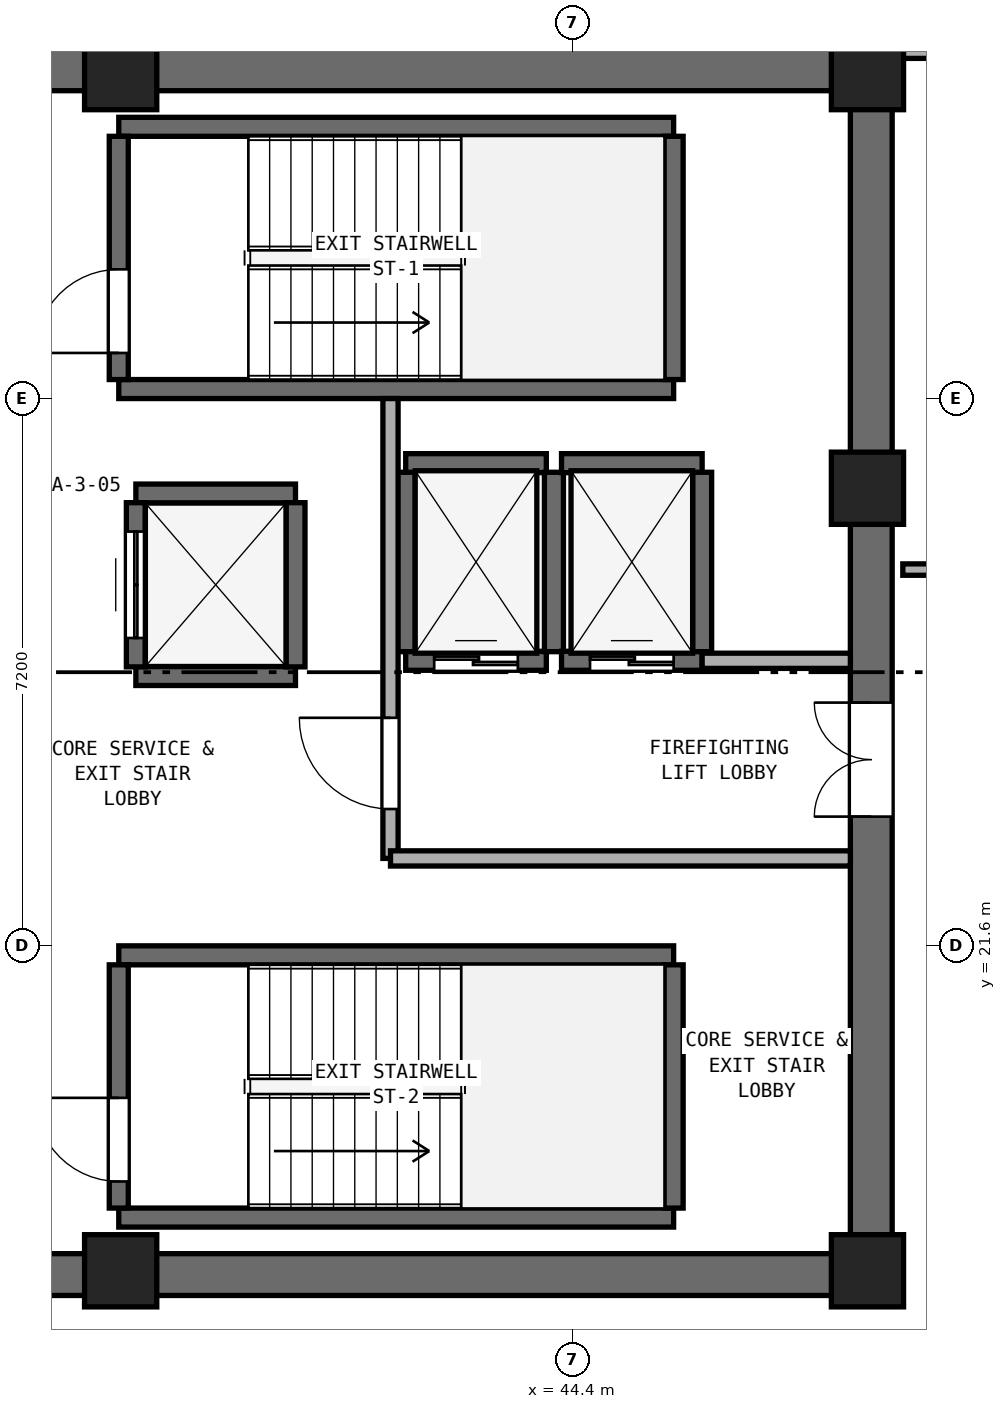
"""IFC4 building model, lengths in metres.
Left out: names, types, materials, properties, quantities, classifications, styles, units other than length and angle.
Written with IfcOpenShell. Run it as: python <this file> out.ifc"""

import sys

from ifc_helpers import new_model, si_unit, direction, frame, frame_2d, origin, origin_2d, place, context, subcontext, project, spatial, rectangle, extrude, element, fill, save


model = new_model("IFC4")
c1 = context("Model", 3, precision=1e-05, world=origin(), true_north=direction((0.0, 1.0)))
c2 = subcontext(c1, "Body", "Model", "MODEL_VIEW")
j1 = project(units=[si_unit("LENGTHUNIT", "METRE"), si_unit("PLANEANGLEUNIT", "RADIAN")], contexts=[c1])
p1 = place(None, origin())
s1 = spatial("IfcSite", under=j1, at=p1, CompositionType="ELEMENT")
p2 = place(p1, origin())
s2 = spatial("IfcBuilding", under=s1, at=p2, CompositionType="ELEMENT")
p3 = place(p2, frame((0.0, 0.0, 159.2)))
s3 = spatial("IfcBuildingStorey", under=s2, at=p3, CompositionType="ELEMENT", Elevation=159.2)
for number, where, z_axis, x_axis in (
    (1, (25.4, 17.275, 0.0), (0.0, 0.0, 1.0), (1.0, 0.0, 0.0)),
    (2, (25.4, 33.125, 0.0), (0.0, 0.0, 1.0), (1.0, 0.0, 0.0)),
):
    element("IfcWall", number, at=place(p3, frame(where, z_axis=z_axis, x_axis=x_axis)), inside=s3, PredefinedType="SHEAR", context=c2, shape_type="SweptSolid", body=[
        extrude(rectangle(XDim=23.2, YDim=0.55, at=frame_2d((11.6, 0.0))), origin(), (0.0, 0.0, 1.0), 3.54),
    ])
p4 = place(p3, frame((48.325, 17.55, 0.0), z_axis=(0.0, 0.0, 1.0), x_axis=(0.0, 1.0, 0.0)))
e3 = element("IfcWall", 3, at=p4, inside=s3, PredefinedType="SHEAR", context=c2, shape_type="SweptSolid", body=[
    extrude(rectangle(XDim=15.3, YDim=0.55, at=frame_2d((7.65, 0.0))), origin(), (0.0, 0.0, 1.0), 3.54),
])
p5 = place(p4, frame((5.75, 0.0, 0.0)))
e4 = element("IfcOpeningElement", 4, at=p5, cuts=e3, PredefinedType="OPENING", context=c2, shape_type="SweptSolid", body=[
    extrude(rectangle(XDim=1.5, YDim=2.15, at=frame_2d((0.75, 1.075))), frame((0.0, 0.285, 0.0), z_axis=(0.0, -1.0, 0.0), x_axis=(1.0, 0.0, 0.0)), (0.0, 0.0, 1.0), 0.57),
])
for number, where, z_axis, x_axis in (
    (5, (38.45, 17.325, 0.0), (0.0, 0.0, 1.0), (1.0, 0.0, 0.0)),
    (6, (48.275, 17.325, 0.0), (0.0, 0.0, 1.0), (1.0, 0.0, 0.0)),
    (7, (48.275, 27.62, 0.0), (0.0, 0.0, 1.0), (1.0, 0.0, 0.0)),
    (8, (48.275, 33.075, 0.0), (0.0, 0.0, 1.0), (1.0, 0.0, 0.0)),
    (9, (38.45, 33.075, 0.0), (0.0, 0.0, 1.0), (1.0, 0.0, 0.0)),
):
    element("IfcColumn", number, at=place(p3, frame(where, z_axis=z_axis, x_axis=x_axis)), inside=s3, PredefinedType="PILASTER", context=c2, shape_type="SweptSolid", body=[
        extrude(rectangle(XDim=0.95, YDim=0.95, at=origin_2d()), origin(), (0.0, 0.0, 1.0), 3.8),
    ])
for number, where, z_axis, x_axis in (
    (10, (38.425, 28.925, 0.0), (0.0, 0.0, 1.0), (1.0, 0.0, 0.0)),
    (11, (38.425, 32.375, 0.0), (0.0, 0.0, 1.0), (1.0, 0.0, 0.0)),
):
    element("IfcWall", number, at=place(p3, frame(where, z_axis=z_axis, x_axis=x_axis)), inside=s3, PredefinedType="SHEAR", context=c2, shape_type="SweptSolid", body=[
        extrude(rectangle(XDim=7.3, YDim=0.25, at=frame_2d((3.65, 0.0))), origin(), (0.0, 0.0, 1.0), 3.54),
    ])
p6 = place(p3, frame((38.425, 29.05, 0.0), z_axis=(0.0, 0.0, 1.0), x_axis=(0.0, 1.0, 0.0)))
e12 = element("IfcWall", 12, at=p6, inside=s3, PredefinedType="SHEAR", context=c2, shape_type="SweptSolid", body=[
    extrude(rectangle(XDim=3.2, YDim=0.25, at=frame_2d((1.6, 0.0))), origin(), (0.0, 0.0, 1.0), 3.54),
])
p7 = place(p6, frame((0.35, 0.0, 0.0)))
e13 = element("IfcOpeningElement", 13, at=p7, cuts=e12, PredefinedType="OPENING", context=c2, shape_type="SweptSolid", body=[
    extrude(rectangle(XDim=1.1, YDim=2.15, at=frame_2d((0.55, 1.075))), frame((0.0, 0.135, 0.0), z_axis=(0.0, -1.0, 0.0), x_axis=(1.0, 0.0, 0.0)), (0.0, 0.0, 1.0), 0.27),
])
p8 = place(p3, frame((45.725, 29.05, 0.0), z_axis=(0.0, 0.0, 1.0), x_axis=(0.0, 1.0, 0.0)))
e14 = element("IfcWall", 14, at=p8, inside=s3, PredefinedType="SHEAR", context=c2, shape_type="SweptSolid", body=[
    extrude(rectangle(XDim=3.2, YDim=0.25, at=frame_2d((1.6, 0.0))), origin(), (0.0, 0.0, 1.0), 3.54),
])
for number, where, z_axis, x_axis in (
    (15, (38.425, 18.025, 0.0), (0.0, 0.0, 1.0), (1.0, 0.0, 0.0)),
    (16, (38.425, 21.475, 0.0), (0.0, 0.0, 1.0), (1.0, 0.0, 0.0)),
):
    element("IfcWall", number, at=place(p3, frame(where, z_axis=z_axis, x_axis=x_axis)), inside=s3, PredefinedType="SHEAR", context=c2, shape_type="SweptSolid", body=[
        extrude(rectangle(XDim=7.3, YDim=0.25, at=frame_2d((3.65, 0.0))), origin(), (0.0, 0.0, 1.0), 3.54),
    ])
p9 = place(p3, frame((38.425, 18.15, 0.0), z_axis=(0.0, 0.0, 1.0), x_axis=(0.0, 1.0, 0.0)))
e17 = element("IfcWall", 17, at=p9, inside=s3, PredefinedType="SHEAR", context=c2, shape_type="SweptSolid", body=[
    extrude(rectangle(XDim=3.2, YDim=0.25, at=frame_2d((1.6, 0.0))), origin(), (0.0, 0.0, 1.0), 3.54),
])
p10 = place(p9, frame((0.35, 0.0, 0.0)))
e18 = element("IfcOpeningElement", 18, at=p10, cuts=e17, PredefinedType="OPENING", context=c2, shape_type="SweptSolid", body=[
    extrude(rectangle(XDim=1.1, YDim=2.15, at=frame_2d((0.55, 1.075))), frame((0.0, 0.135, 0.0), z_axis=(0.0, -1.0, 0.0), x_axis=(1.0, 0.0, 0.0)), (0.0, 0.0, 1.0), 0.27),
])
p11 = place(p3, frame((45.725, 18.15, 0.0), z_axis=(0.0, 0.0, 1.0), x_axis=(0.0, 1.0, 0.0)))
e19 = element("IfcWall", 19, at=p11, inside=s3, PredefinedType="SHEAR", context=c2, shape_type="SweptSolid", body=[
    extrude(rectangle(XDim=3.2, YDim=0.25, at=frame_2d((1.6, 0.0))), origin(), (0.0, 0.0, 1.0), 3.54),
])
p12 = place(p3, frame((42.2, 25.35, 0.0), z_axis=(0.0, 0.0, 1.0), x_axis=(1.0, 0.0, 0.0)))
e20 = element("IfcWall", 20, at=p12, inside=s3, PredefinedType="SHEAR", context=c2, shape_type="SweptSolid", body=[
    extrude(rectangle(XDim=1.85, YDim=0.25, at=frame_2d((0.925, 0.0))), origin(), (0.0, 0.0, 1.0), 3.54),
])
p13 = place(p12, frame((0.375, 0.0, 0.0)))
e21 = element("IfcOpeningElement", 21, at=p13, cuts=e20, PredefinedType="OPENING", context=c2, shape_type="SweptSolid", body=[
    extrude(rectangle(XDim=1.1, YDim=2.15, at=frame_2d((0.55, 1.075))), frame((0.0, 0.135, 0.0), z_axis=(0.0, -1.0, 0.0), x_axis=(1.0, 0.0, 0.0)), (0.0, 0.0, 1.0), 0.27),
])
p14 = place(p3, frame((42.2, 27.95, 0.0), z_axis=(0.0, 0.0, 1.0), x_axis=(1.0, 0.0, 0.0)))
e22 = element("IfcWall", 22, at=p14, inside=s3, PredefinedType="SHEAR", context=c2, shape_type="SweptSolid", body=[
    extrude(rectangle(XDim=1.85, YDim=0.25, at=frame_2d((0.925, 0.0))), origin(), (0.0, 0.0, 1.0), 3.54),
])
for number, where, z_axis, x_axis in (
    (23, (42.2, 25.47, 0.0), (0.0, 0.0, 1.0), (0.0, 1.0, 0.0)),
    (24, (44.15, 25.47, 0.0), (0.0, 0.0, 1.0), (0.0, 1.0, 0.0)),
):
    element("IfcWall", number, at=place(p3, frame(where, z_axis=z_axis, x_axis=x_axis)), inside=s3, PredefinedType="SHEAR", context=c2, shape_type="SweptSolid", body=[
        extrude(rectangle(XDim=2.36, YDim=0.25, at=frame_2d((1.18, 0.0))), origin(), (0.0, 0.0, 1.0), 3.54),
    ])
p15 = place(p3, frame((44.25, 25.35, 0.0), z_axis=(0.0, 0.0, 1.0), x_axis=(1.0, 0.0, 0.0)))
e25 = element("IfcWall", 25, at=p15, inside=s3, PredefinedType="SHEAR", context=c2, shape_type="SweptSolid", body=[
    extrude(rectangle(XDim=1.85, YDim=0.25, at=frame_2d((0.925, 0.0))), origin(), (0.0, 0.0, 1.0), 3.54),
])
p16 = place(p15, frame((0.375, 0.0, 0.0)))
e26 = element("IfcOpeningElement", 26, at=p16, cuts=e25, PredefinedType="OPENING", context=c2, shape_type="SweptSolid", body=[
    extrude(rectangle(XDim=1.1, YDim=2.15, at=frame_2d((0.55, 1.075))), frame((0.0, 0.135, 0.0), z_axis=(0.0, -1.0, 0.0), x_axis=(1.0, 0.0, 0.0)), (0.0, 0.0, 1.0), 0.27),
])
p17 = place(p3, frame((44.25, 27.95, 0.0), z_axis=(0.0, 0.0, 1.0), x_axis=(1.0, 0.0, 0.0)))
e27 = element("IfcWall", 27, at=p17, inside=s3, PredefinedType="SHEAR", context=c2, shape_type="SweptSolid", body=[
    extrude(rectangle(XDim=1.85, YDim=0.25, at=frame_2d((0.925, 0.0))), origin(), (0.0, 0.0, 1.0), 3.54),
])
p18 = place(p3, frame((46.1, 25.47, 0.0), z_axis=(0.0, 0.0, 1.0), x_axis=(0.0, 1.0, 0.0)))
e28 = element("IfcWall", 28, at=p18, inside=s3, PredefinedType="SHEAR", context=c2, shape_type="SweptSolid", body=[
    extrude(rectangle(XDim=2.36, YDim=0.25, at=frame_2d((1.18, 0.0))), origin(), (0.0, 0.0, 1.0), 3.54),
])
for number, where, z_axis, x_axis in (
    (29, (38.65, 25.15, 0.0), (0.0, 0.0, 1.0), (1.0, 0.0, 0.0)),
    (30, (38.65, 27.55, 0.0), (0.0, 0.0, 1.0), (1.0, 0.0, 0.0)),
):
    element("IfcWall", number, at=place(p3, frame(where, z_axis=z_axis, x_axis=x_axis)), inside=s3, PredefinedType="SHEAR", context=c2, shape_type="SweptSolid", body=[
        extrude(rectangle(XDim=2.1, YDim=0.25, at=frame_2d((1.05, 0.0))), origin(), (0.0, 0.0, 1.0), 3.54),
    ])
p19 = place(p3, frame((38.65, 25.27, 0.0), z_axis=(0.0, 0.0, 1.0), x_axis=(0.0, 1.0, 0.0)))
e31 = element("IfcWall", 31, at=p19, inside=s3, PredefinedType="SHEAR", context=c2, shape_type="SweptSolid", body=[
    extrude(rectangle(XDim=2.16, YDim=0.25, at=frame_2d((1.08, 0.0))), origin(), (0.0, 0.0, 1.0), 3.54),
])
p20 = place(p19, frame((0.38, 0.0, 0.0)))
e32 = element("IfcOpeningElement", 32, at=p20, cuts=e31, PredefinedType="OPENING", context=c2, shape_type="SweptSolid", body=[
    extrude(rectangle(XDim=1.4, YDim=2.2, at=frame_2d((0.7, 1.1))), frame((0.0, 0.135, 0.0), z_axis=(0.0, -1.0, 0.0), x_axis=(1.0, 0.0, 0.0)), (0.0, 0.0, 1.0), 0.27),
])
p21 = place(p3, frame((40.75, 25.27, 0.0), z_axis=(0.0, 0.0, 1.0), x_axis=(0.0, 1.0, 0.0)))
e33 = element("IfcWall", 33, at=p21, inside=s3, PredefinedType="SHEAR", context=c2, shape_type="SweptSolid", body=[
    extrude(rectangle(XDim=2.16, YDim=0.25, at=frame_2d((1.08, 0.0))), origin(), (0.0, 0.0, 1.0), 3.54),
])
p22 = place(p3, frame((42.0, 22.75, 0.0), z_axis=(0.0, 0.0, 1.0), x_axis=(0.0, 1.0, 0.0)))
e34 = element("IfcWall", 34, at=p22, inside=s3, PredefinedType="SOLIDWALL", context=c2, shape_type="SweptSolid", body=[
    extrude(rectangle(XDim=6.05, YDim=0.2, at=frame_2d((3.025, 0.0))), origin(), (0.0, 0.0, 1.0), 3.54),
])
p23 = place(p22, frame((0.65, 0.0, 0.0)))
e35 = element("IfcOpeningElement", 35, at=p23, cuts=e34, PredefinedType="OPENING", context=c2, shape_type="SweptSolid", body=[
    extrude(rectangle(XDim=1.2, YDim=2.15, at=frame_2d((0.6, 1.075))), frame((0.0, 0.11, 0.0), z_axis=(0.0, -1.0, 0.0), x_axis=(1.0, 0.0, 0.0)), (0.0, 0.0, 1.0), 0.22),
])
p24 = place(p3, frame((42.0, 22.75, 0.0), z_axis=(0.0, 0.0, 1.0), x_axis=(1.0, 0.0, 0.0)))
e36 = element("IfcWall", 36, at=p24, inside=s3, PredefinedType="SOLIDWALL", context=c2, shape_type="SweptSolid", body=[
    extrude(rectangle(XDim=6.05, YDim=0.2, at=frame_2d((3.025, 0.0))), origin(), (0.0, 0.0, 1.0), 3.54),
])
p25 = place(p3, frame((46.1, 25.35, 0.0), z_axis=(0.0, 0.0, 1.0), x_axis=(1.0, 0.0, 0.0)))
e37 = element("IfcWall", 37, at=p25, inside=s3, PredefinedType="SOLIDWALL", context=c2, shape_type="SweptSolid", body=[
    extrude(rectangle(XDim=1.95, YDim=0.2, at=frame_2d((0.975, 0.0))), origin(), (0.0, 0.0, 1.0), 3.54),
])
p26 = place(p3, frame((48.74, 26.55, 0.0), z_axis=(0.0, 0.0, 1.0), x_axis=(1.0, 0.0, 0.0)))
e38 = element("IfcWall", 38, at=p26, inside=s3, PredefinedType="PARTITIONING", context=c2, shape_type="SweptSolid", body=[
    extrude(rectangle(XDim=12.855, YDim=0.15, at=frame_2d((6.427, 0.0))), origin(), (0.0, 0.0, 1.0), 3.54),
])
p27 = place(p26, frame((5.927, 0.0, 0.0)))
e39 = element("IfcOpeningElement", 39, at=p27, cuts=e38, PredefinedType="OPENING", context=c2, shape_type="SweptSolid", body=[
    extrude(rectangle(XDim=1.0, YDim=2.12, at=frame_2d((0.5, 1.06))), frame((0.0, 0.085, 0.0), z_axis=(0.0, -1.0, 0.0), x_axis=(1.0, 0.0, 0.0)), (0.0, 0.0, 1.0), 0.17),
])
p28 = place(p3, frame((48.74, 33.35, 0.0), z_axis=(0.0, 0.0, 1.0), x_axis=(1.0, 0.0, 0.0)))
e40 = element("IfcWall", 40, at=p28, inside=s3, PredefinedType="PARTITIONING", context=c2, shape_type="SweptSolid", body=[
    extrude(rectangle(XDim=3.309, YDim=0.15, at=frame_2d((1.654, 0.0))), origin(), (0.0, 0.0, 1.0), 2.923),
])
p29 = place(p7, origin())
e41 = element("IfcDoor", 41, at=p29, inside=s3, OperationType="SINGLE_SWING_LEFT", PredefinedType="DOOR", context=c2, shape_type="SweptSolid", body=[
    extrude(rectangle(XDim=1.1, YDim=2.15, at=frame_2d((0.55, 1.075))), frame((0.0, 0.025, 0.0), z_axis=(0.0, -1.0, 0.0), x_axis=(1.0, 0.0, 0.0)), (0.0, 0.0, 1.0), 0.05),
])
fill(e13, e41)
p30 = place(p10, origin())
e42 = element("IfcDoor", 42, at=p30, inside=s3, OperationType="SINGLE_SWING_RIGHT", PredefinedType="DOOR", context=c2, shape_type="SweptSolid", body=[
    extrude(rectangle(XDim=1.1, YDim=2.15, at=frame_2d((0.55, 1.075))), frame((0.0, 0.025, 0.0), z_axis=(0.0, -1.0, 0.0), x_axis=(1.0, 0.0, 0.0)), (0.0, 0.0, 1.0), 0.05),
])
fill(e18, e42)
p31 = place(p13, origin())
e43 = element("IfcDoor", 43, at=p31, inside=s3, OperationType="DOUBLE_DOOR_SLIDING", PredefinedType="DOOR", context=c2, shape_type="SweptSolid", body=[
    extrude(rectangle(XDim=1.1, YDim=2.15, at=frame_2d((0.55, 1.075))), frame((0.0, 0.025, 0.0), z_axis=(0.0, -1.0, 0.0), x_axis=(1.0, 0.0, 0.0)), (0.0, 0.0, 1.0), 0.05),
])
fill(e21, e43)
p32 = place(p16, origin())
e44 = element("IfcDoor", 44, at=p32, inside=s3, OperationType="DOUBLE_DOOR_SLIDING", PredefinedType="DOOR", context=c2, shape_type="SweptSolid", body=[
    extrude(rectangle(XDim=1.1, YDim=2.15, at=frame_2d((0.55, 1.075))), frame((0.0, 0.025, 0.0), z_axis=(0.0, -1.0, 0.0), x_axis=(1.0, 0.0, 0.0)), (0.0, 0.0, 1.0), 0.05),
])
fill(e26, e44)
p33 = place(p20, origin())
e45 = element("IfcDoor", 45, at=p33, inside=s3, OperationType="DOUBLE_DOOR_SLIDING", PredefinedType="DOOR", context=c2, shape_type="SweptSolid", body=[
    extrude(rectangle(XDim=1.4, YDim=2.2, at=frame_2d((0.7, 1.1))), frame((0.0, 0.025, 0.0), z_axis=(0.0, -1.0, 0.0), x_axis=(1.0, 0.0, 0.0)), (0.0, 0.0, 1.0), 0.05),
])
fill(e32, e45)
p34 = place(p23, origin())
e46 = element("IfcDoor", 46, at=p34, inside=s3, OperationType="SINGLE_SWING_RIGHT", PredefinedType="DOOR", context=c2, shape_type="SweptSolid", body=[
    extrude(rectangle(XDim=1.2, YDim=2.15, at=frame_2d((0.6, 1.075))), frame((0.0, 0.025, 0.0), z_axis=(0.0, -1.0, 0.0), x_axis=(1.0, 0.0, 0.0)), (0.0, 0.0, 1.0), 0.05),
])
fill(e35, e46)
p35 = place(p5, origin())
e47 = element("IfcDoor", 47, at=p35, inside=s3, OperationType="DOUBLE_DOOR_SINGLE_SWING", PredefinedType="DOOR", context=c2, shape_type="SweptSolid", body=[
    extrude(rectangle(XDim=1.5, YDim=2.15, at=frame_2d((0.75, 1.075))), frame((0.0, 0.025, 0.0), z_axis=(0.0, -1.0, 0.0), x_axis=(1.0, 0.0, 0.0)), (0.0, 0.0, 1.0), 0.05),
])
fill(e4, e47)
save(model, sys.argv[1])
